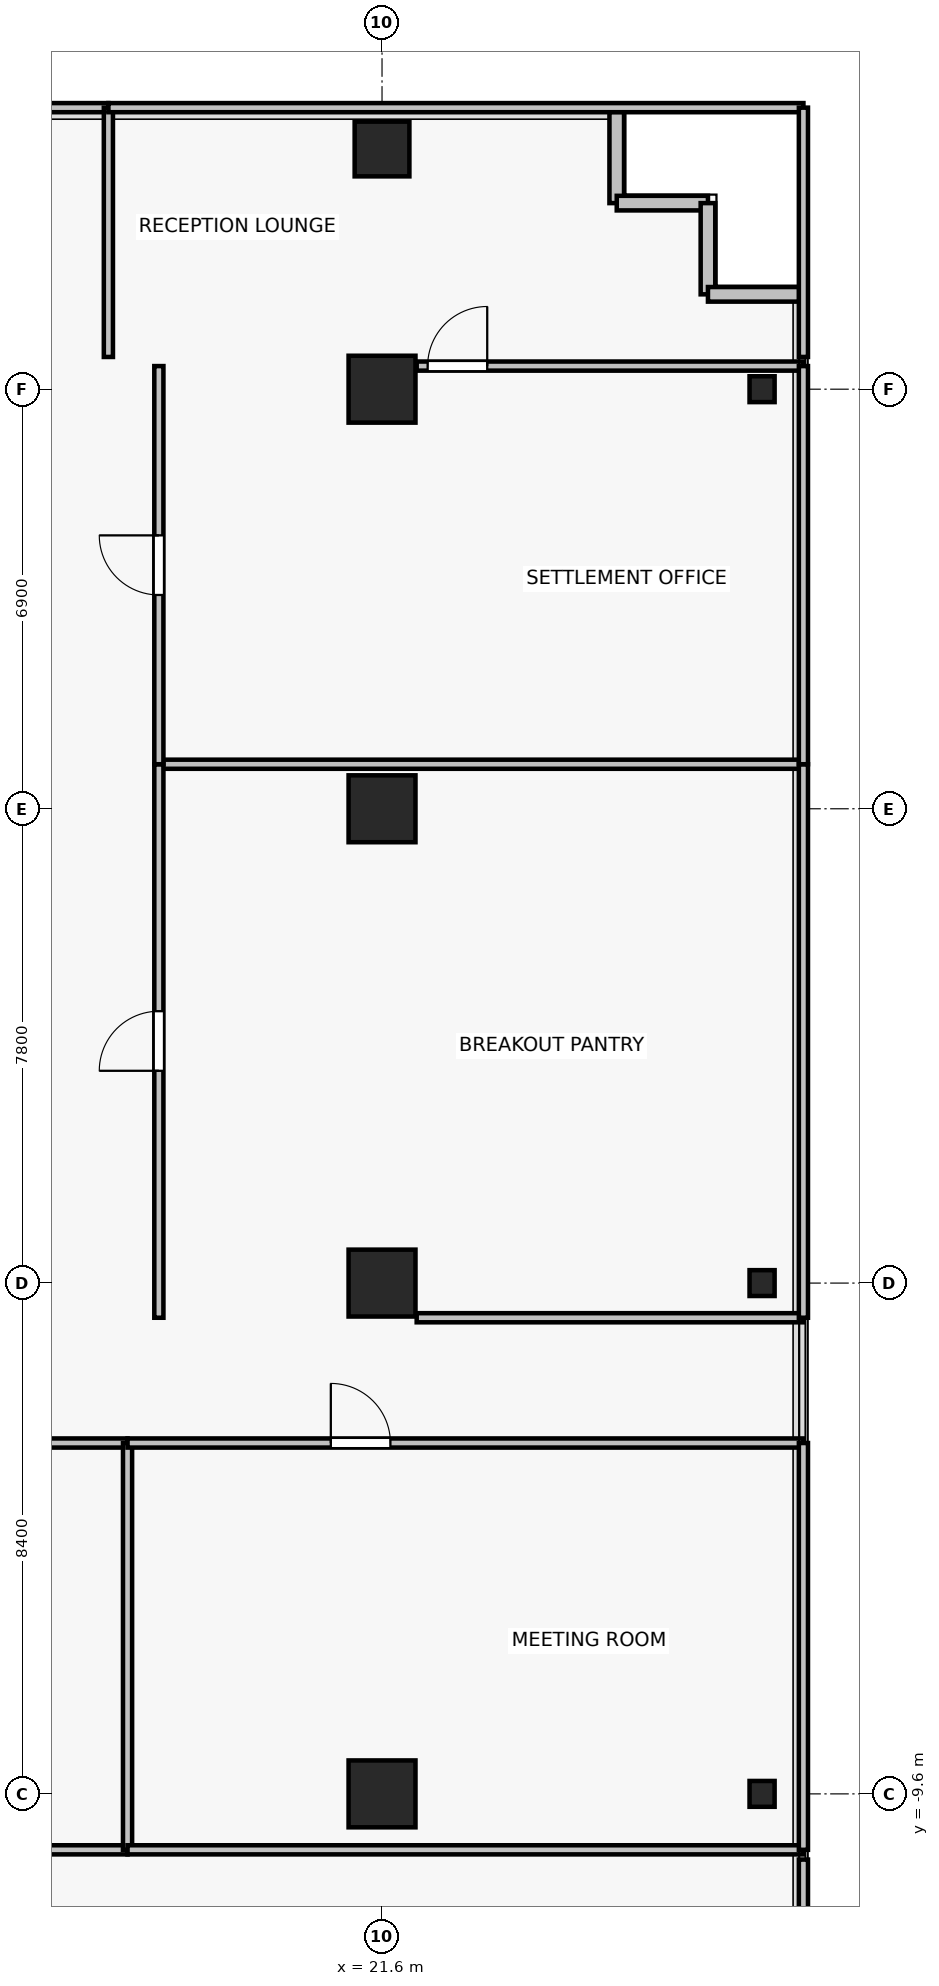
"""IFC4 building model, lengths in metres.
Left out: names, types, materials, properties, quantities, classifications, styles, units other than length and angle.
Written with IfcOpenShell. Run it as: python <this file> out.ifc"""

import sys

from ifc_helpers import new_model, si_unit, direction, frame, frame_2d, origin, origin_2d, place, context, subcontext, project, spatial, rectangle, i_section, extrude, source, transform, mapped, element, fill, save


model = new_model("IFC4")
c1 = context("Model", 3, precision=1e-05, world=origin(), true_north=direction((0.0, 1.0)))
c2 = subcontext(c1, "Body", "Model", "MODEL_VIEW")
j1 = project(units=[si_unit("LENGTHUNIT", "METRE"), si_unit("PLANEANGLEUNIT", "RADIAN")], contexts=[c1])
p1 = place(None, origin())
s1 = spatial("IfcSite", under=j1, at=p1, CompositionType="ELEMENT")
p2 = place(p1, origin())
s2 = spatial("IfcBuilding", under=s1, at=p2, CompositionType="ELEMENT")
p3 = place(p2, frame((0.0, 0.0, 40.6)))
s3 = spatial("IfcBuildingStorey", under=s2, at=p3, CompositionType="ELEMENT", Elevation=40.6)
for number, where, z_axis, x_axis in (
    (1, (21.6, -9.6, 0.0), (0.0, 0.0, 1.0), (1.0, 0.0, 0.0)),
    (2, (21.6, -1.2, 0.0), (0.0, 0.0, 1.0), (1.0, 0.0, 0.0)),
    (3, (21.6, 6.6, 0.0), (0.0, 0.0, 1.0), (1.0, 0.0, 0.0)),
    (4, (21.6, 13.5, 0.0), (0.0, 0.0, 1.0), (1.0, 0.0, 0.0)),
):
    element("IfcColumn", number, at=place(p3, frame(where, z_axis=z_axis, x_axis=x_axis)), inside=s3, PredefinedType="COLUMN", context=c2, shape_type="SweptSolid", body=[
        extrude(rectangle(XDim=1.1, YDim=1.1, at=origin_2d()), origin(), (0.0, 0.0, 1.0), 3.3),
    ])
p4 = place(p3, frame((21.6, 17.45, 0.0), z_axis=(0.0, 0.0, 1.0), x_axis=(1.0, 0.0, 0.0)))
e5 = element("IfcColumn", 5, at=p4, inside=s3, PredefinedType="COLUMN", context=c2, shape_type="SweptSolid", body=[
    extrude(rectangle(XDim=0.9, YDim=0.9, at=origin_2d()), origin(), (0.0, 0.0, 1.0), 3.3),
])
for number, where, z_axis, x_axis in (
    (6, (27.85, -9.6, 0.0), (0.0, 0.0, 1.0), (1.0, 0.0, 0.0)),
    (7, (27.85, -1.2, 0.0), (0.0, 0.0, 1.0), (1.0, 0.0, 0.0)),
    (8, (27.85, 13.5, 0.0), (0.0, 0.0, 1.0), (1.0, 0.0, 0.0)),
):
    element("IfcColumn", number, at=place(p3, frame(where, z_axis=z_axis, x_axis=x_axis)), inside=s3, PredefinedType="COLUMN", context=c2, shape_type="SweptSolid", body=[
        extrude(i_section(OverallWidth=0.412, OverallDepth=0.425, WebThickness=0.026, FlangeThickness=0.039, FilletRadius=0.015, at=origin_2d()), origin(), (0.0, 0.0, 1.0), 3.3),
    ])
for number, where, z_axis, x_axis in (
    (9, (25.46, 16.56, 0.0), (0.0, 0.0, 1.0), (0.0, 1.0, 0.0)),
    (10, (26.96, 16.56, 0.0), (0.0, 0.0, 1.0), (-1.0, 0.0, 0.0)),
    (11, (26.96, 15.06, 0.0), (0.0, 0.0, 1.0), (0.0, 1.0, 0.0)),
    (12, (28.46, 15.06, 0.0), (0.0, 0.0, 1.0), (-1.0, 0.0, 0.0)),
):
    element("IfcWall", number, at=place(p3, frame(where, z_axis=z_axis, x_axis=x_axis)), inside=s3, PredefinedType="SOLIDWALL", context=c2, shape_type="SweptSolid", body=[
        extrude(rectangle(XDim=1.5, YDim=0.24, at=frame_2d((0.75, 0.0))), origin(), (0.0, 0.0, 1.0), 3.075),
    ])
p5 = place(p3, frame((17.415, -10.52, 0.0), z_axis=(0.0, 0.0, 1.0), x_axis=(-1.0, 0.0, 0.0)))
e13 = element("IfcWall", 13, at=p5, inside=s3, PredefinedType="PARTITIONING", context=c2, shape_type="SweptSolid", body=[
    extrude(rectangle(XDim=7.985, YDim=0.15, at=frame_2d((3.993, 0.0))), origin(), (0.0, 0.0, 1.0), 2.465),
])
p6 = place(p5, frame((6.825, 0.0, 0.0)))
e14 = element("IfcOpeningElement", 14, at=p6, cuts=e13, PredefinedType="OPENING", context=c2, shape_type="SweptSolid", body=[
    extrude(rectangle(XDim=0.98, YDim=2.15, at=frame_2d((0.49, 1.075))), frame((0.0, 0.085, 0.0), z_axis=(0.0, -1.0, 0.0), x_axis=(1.0, 0.0, 0.0)), (0.0, 0.0, 1.0), 0.17),
])
p7 = place(p3, frame((9.43, -3.83, 0.0), z_axis=(0.0, 0.0, 1.0), x_axis=(1.0, 0.0, 0.0)))
e15 = element("IfcWall", 15, at=p7, inside=s3, PredefinedType="PARTITIONING", context=c2, shape_type="SweptSolid", body=[
    extrude(rectangle(XDim=7.985, YDim=0.15, at=frame_2d((3.993, 0.0))), origin(), (0.0, 0.0, 1.0), 2.465),
])
p8 = place(p7, frame((3.502, 0.0, 0.0)))
e16 = element("IfcOpeningElement", 16, at=p8, cuts=e15, PredefinedType="OPENING", context=c2, shape_type="SweptSolid", body=[
    extrude(rectangle(XDim=0.98, YDim=2.15, at=frame_2d((0.49, 1.075))), frame((0.0, 0.085, 0.0), z_axis=(0.0, -1.0, 0.0), x_axis=(1.0, 0.0, 0.0)), (0.0, 0.0, 1.0), 0.17),
])
p9 = place(p3, frame((17.415, -3.83, 0.0), z_axis=(0.0, 0.0, 1.0), x_axis=(0.0, -1.0, 0.0)))
e17 = element("IfcWall", 17, at=p9, inside=s3, PredefinedType="PARTITIONING", context=c2, shape_type="SweptSolid", body=[
    extrude(rectangle(XDim=6.69, YDim=0.15, at=frame_2d((3.345, 0.0))), origin(), (0.0, 0.0, 1.0), 2.465),
])
p10 = place(p3, frame((28.53, -10.52, 0.0), z_axis=(0.0, 0.0, 1.0), x_axis=(-1.0, 0.0, 0.0)))
e18 = element("IfcWall", 18, at=p10, inside=s3, PredefinedType="PARTITIONING", context=c2, shape_type="SweptSolid", body=[
    extrude(rectangle(XDim=11.115, YDim=0.15, at=frame_2d((5.558, 0.0))), origin(), (0.0, 0.0, 1.0), 2.465),
])
p11 = place(p3, frame((17.415, -3.83, 0.0), z_axis=(0.0, 0.0, 1.0), x_axis=(1.0, 0.0, 0.0)))
e19 = element("IfcWall", 19, at=p11, inside=s3, PredefinedType="PARTITIONING", context=c2, shape_type="SweptSolid", body=[
    extrude(rectangle(XDim=11.115, YDim=0.15, at=frame_2d((5.558, 0.0))), origin(), (0.0, 0.0, 1.0), 2.465),
])
p12 = place(p11, frame((3.343, 0.0, 0.0)))
e20 = element("IfcOpeningElement", 20, at=p12, cuts=e19, PredefinedType="OPENING", context=c2, shape_type="SweptSolid", body=[
    extrude(rectangle(XDim=0.98, YDim=2.15, at=frame_2d((0.49, 1.075))), frame((0.0, 0.085, 0.0), z_axis=(0.0, -1.0, 0.0), x_axis=(1.0, 0.0, 0.0)), (0.0, 0.0, 1.0), 0.17),
])
p13 = place(p3, frame((28.53, -3.83, 0.0), z_axis=(0.0, 0.0, 1.0), x_axis=(0.0, -1.0, 0.0)))
e21 = element("IfcWall", 21, at=p13, inside=s3, PredefinedType="PARTITIONING", context=c2, shape_type="SweptSolid", body=[
    extrude(rectangle(XDim=6.69, YDim=0.15, at=frame_2d((3.345, 0.0))), origin(), (0.0, 0.0, 1.0), 2.665),
])
p14 = place(p3, frame((28.53, -10.68, 0.0), z_axis=(0.0, 0.0, 1.0), x_axis=(0.0, -1.0, 0.0)))
e22 = element("IfcWall", 22, at=p14, inside=s3, PredefinedType="PARTITIONING", context=c2, shape_type="SweptSolid", body=[
    extrude(rectangle(XDim=7.45, YDim=0.15, at=frame_2d((3.725, 0.0))), origin(), (0.0, 0.0, 1.0), 3.075),
])
p15 = place(p3, frame((28.53, -1.77, 0.0), z_axis=(0.0, 0.0, 1.0), x_axis=(-1.0, 0.0, 0.0)))
e23 = element("IfcWall", 23, at=p15, inside=s3, PredefinedType="PARTITIONING", context=c2, shape_type="SweptSolid", body=[
    extrude(rectangle(XDim=6.36, YDim=0.15, at=frame_2d((3.18, 0.0))), origin(), (0.0, 0.0, 1.0), 2.465),
])
p16 = place(p3, frame((17.93, 7.333, 0.0), z_axis=(0.0, 0.0, 1.0), x_axis=(1.0, 0.0, 0.0)))
e24 = element("IfcWall", 24, at=p16, inside=s3, PredefinedType="PARTITIONING", context=c2, shape_type="SweptSolid", body=[
    extrude(rectangle(XDim=10.6, YDim=0.15, at=frame_2d((5.3, 0.0))), origin(), (0.0, 0.0, 1.0), 2.465),
])
p17 = place(p3, frame((17.93, -1.77, 0.0), z_axis=(0.0, 0.0, 1.0), x_axis=(0.0, 1.0, 0.0)))
e25 = element("IfcWall", 25, at=p17, inside=s3, PredefinedType="PARTITIONING", context=c2, shape_type="SweptSolid", body=[
    extrude(rectangle(XDim=9.103, YDim=0.15, at=frame_2d((4.551, 0.0))), origin(), (0.0, 0.0, 1.0), 2.465),
])
p18 = place(p17, frame((4.061, 0.0, 0.0)))
e26 = element("IfcOpeningElement", 26, at=p18, cuts=e25, PredefinedType="OPENING", context=c2, shape_type="SweptSolid", body=[
    extrude(rectangle(XDim=0.98, YDim=2.15, at=frame_2d((0.49, 1.075))), frame((0.0, 0.085, 0.0), z_axis=(0.0, -1.0, 0.0), x_axis=(1.0, 0.0, 0.0)), (0.0, 0.0, 1.0), 0.17),
])
p19 = place(p3, frame((28.53, 7.333, 0.0), z_axis=(0.0, 0.0, 1.0), x_axis=(0.0, -1.0, 0.0)))
e27 = element("IfcWall", 27, at=p19, inside=s3, PredefinedType="PARTITIONING", context=c2, shape_type="SweptSolid", body=[
    extrude(rectangle(XDim=9.103, YDim=0.15, at=frame_2d((4.551, 0.0))), origin(), (0.0, 0.0, 1.0), 3.075),
])
p20 = place(p3, frame((22.17, 13.88, 0.0), z_axis=(0.0, 0.0, 1.0), x_axis=(1.0, 0.0, 0.0)))
e28 = element("IfcWall", 28, at=p20, inside=s3, PredefinedType="PARTITIONING", context=c2, shape_type="SweptSolid", body=[
    extrude(rectangle(XDim=6.36, YDim=0.15, at=frame_2d((3.18, 0.0))), origin(), (0.0, 0.0, 1.0), 3.075),
])
p21 = place(p20, frame((0.18, 0.0, 0.0)))
e29 = element("IfcOpeningElement", 29, at=p21, cuts=e28, PredefinedType="OPENING", context=c2, shape_type="SweptSolid", body=[
    extrude(rectangle(XDim=0.98, YDim=2.15, at=frame_2d((0.49, 1.075))), frame((0.0, 0.085, 0.0), z_axis=(0.0, -1.0, 0.0), x_axis=(1.0, 0.0, 0.0)), (0.0, 0.0, 1.0), 0.17),
])
p22 = place(p3, frame((17.93, 7.333, 0.0), z_axis=(0.0, 0.0, 1.0), x_axis=(0.0, 1.0, 0.0)))
e30 = element("IfcWall", 30, at=p22, inside=s3, PredefinedType="PARTITIONING", context=c2, shape_type="SweptSolid", body=[
    extrude(rectangle(XDim=6.547, YDim=0.15, at=frame_2d((3.274, 0.0))), origin(), (0.0, 0.0, 1.0), 2.465),
])
p23 = place(p22, frame((2.783, 0.0, 0.0)))
e31 = element("IfcOpeningElement", 31, at=p23, cuts=e30, PredefinedType="OPENING", context=c2, shape_type="SweptSolid", body=[
    extrude(rectangle(XDim=0.98, YDim=2.15, at=frame_2d((0.49, 1.075))), frame((0.0, 0.085, 0.0), z_axis=(0.0, -1.0, 0.0), x_axis=(1.0, 0.0, 0.0)), (0.0, 0.0, 1.0), 0.17),
])
p24 = place(p3, frame((28.53, 13.88, 0.0), z_axis=(0.0, 0.0, 1.0), x_axis=(0.0, -1.0, 0.0)))
e32 = element("IfcWall", 32, at=p24, inside=s3, PredefinedType="PARTITIONING", context=c2, shape_type="SweptSolid", body=[
    extrude(rectangle(XDim=6.547, YDim=0.15, at=frame_2d((3.274, 0.0))), origin(), (0.0, 0.0, 1.0), 3.075),
])
p25 = place(p3, frame((-32.53, 18.13, 0.0), z_axis=(0.0, 0.0, 1.0), x_axis=(1.0, 0.0, 0.0)))
e33 = element("IfcWall", 33, at=p25, inside=s3, PredefinedType="PARTITIONING", context=c2, shape_type="SweptSolid", body=[
    extrude(rectangle(XDim=49.63, YDim=0.15, at=frame_2d((24.815, 0.0))), origin(), (0.0, 0.0, 1.0), 3.075),
])
p26 = place(p3, frame((17.1, 18.13, 0.0), z_axis=(0.0, 0.0, 1.0), x_axis=(0.0, -1.0, 0.0)))
e34 = element("IfcWall", 34, at=p26, inside=s3, PredefinedType="PARTITIONING", context=c2, shape_type="SweptSolid", body=[
    extrude(rectangle(XDim=4.1, YDim=0.15, at=frame_2d((2.05, 0.0))), origin(), (0.0, 0.0, 1.0), 2.465),
])
p27 = place(p3, frame((17.1, 18.13, 0.0), z_axis=(0.0, 0.0, 1.0), x_axis=(1.0, 0.0, 0.0)))
e35 = element("IfcWall", 35, at=p27, inside=s3, PredefinedType="PARTITIONING", context=c2, shape_type="SweptSolid", body=[
    extrude(rectangle(XDim=11.43, YDim=0.15, at=frame_2d((5.715, 0.0))), origin(), (0.0, 0.0, 1.0), 3.075),
])
p28 = place(p3, frame((28.53, 18.13, 0.0), z_axis=(0.0, 0.0, 1.0), x_axis=(0.0, -1.0, 0.0)))
e36 = element("IfcWall", 36, at=p28, inside=s3, PredefinedType="PARTITIONING", context=c2, shape_type="SweptSolid", body=[
    extrude(rectangle(XDim=4.1, YDim=0.15, at=frame_2d((2.05, 0.0))), origin(), (0.0, 0.0, 1.0), 3.075),
])
m1 = source(origin(), c2, "Body", "SweptSolid", [
    extrude(rectangle(XDim=0.98, YDim=2.15, at=frame_2d((0.49, 1.075))), frame((0.0, 0.025, 0.0), z_axis=(0.0, -1.0, 0.0), x_axis=(1.0, 0.0, 0.0)), (0.0, 0.0, 1.0), 0.05),
])
p29 = place(p12, origin())
e37 = element("IfcDoor", 37, at=p29, inside=s3, OperationType="SINGLE_SWING_LEFT", PredefinedType="DOOR", context=c2, shape_type="MappedRepresentation", body=[
    mapped(m1, transform((0.0, 0.0, 0.0), x_axis=(1.0, 0.0, 0.0), y_axis=(0.0, 1.0, 0.0), z_axis=(0.0, 0.0, 1.0), scale=1.0)),
])
fill(e20, e37)
p30 = place(p18, origin())
e38 = element("IfcDoor", 38, at=p30, inside=s3, OperationType="SINGLE_SWING_LEFT", PredefinedType="DOOR", context=c2, shape_type="MappedRepresentation", body=[
    mapped(m1, transform((0.0, 0.0, 0.0), x_axis=(1.0, 0.0, 0.0), y_axis=(0.0, 1.0, 0.0), z_axis=(0.0, 0.0, 1.0), scale=1.0)),
])
fill(e26, e38)
p31 = place(p23, origin())
e39 = element("IfcDoor", 39, at=p31, inside=s3, OperationType="SINGLE_SWING_RIGHT", PredefinedType="DOOR", context=c2, shape_type="MappedRepresentation", body=[
    mapped(m1, transform((0.0, 0.0, 0.0), x_axis=(1.0, 0.0, 0.0), y_axis=(0.0, 1.0, 0.0), z_axis=(0.0, 0.0, 1.0), scale=1.0)),
])
fill(e31, e39)
p32 = place(p21, origin())
e40 = element("IfcDoor", 40, at=p32, inside=s3, OperationType="SINGLE_SWING_RIGHT", PredefinedType="DOOR", context=c2, shape_type="MappedRepresentation", body=[
    mapped(m1, transform((0.0, 0.0, 0.0), x_axis=(1.0, 0.0, 0.0), y_axis=(0.0, 1.0, 0.0), z_axis=(0.0, 0.0, 1.0), scale=1.0)),
])
fill(e29, e40)
save(model, sys.argv[1])
